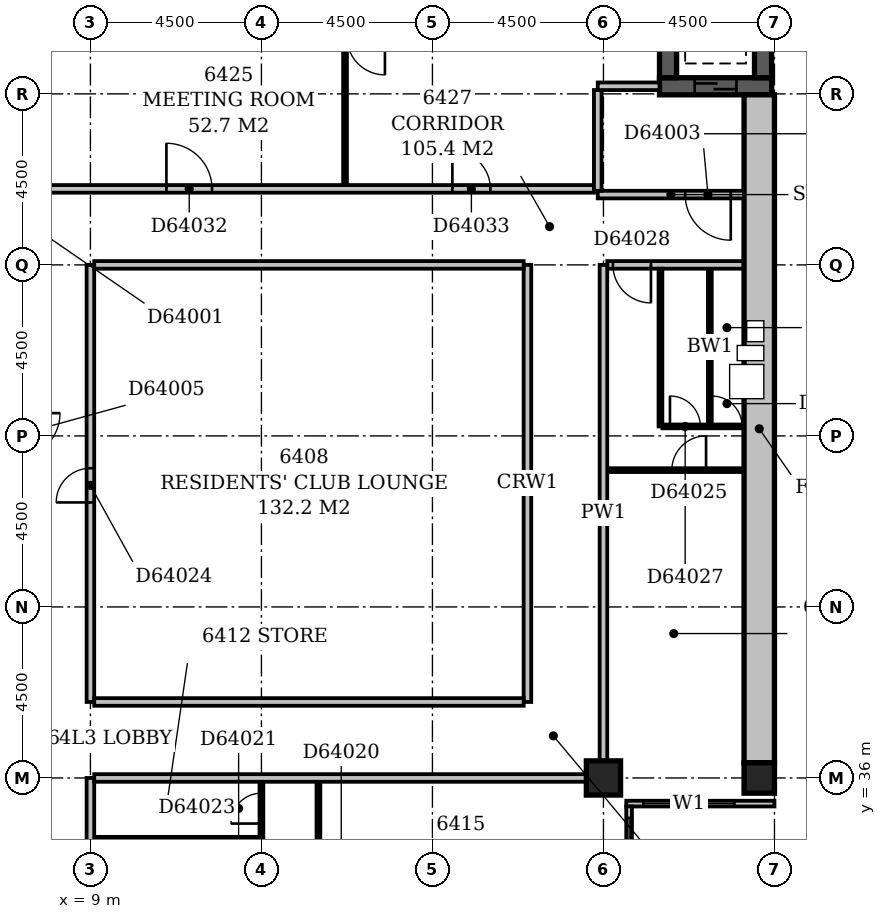
"""IFC4 building model, lengths in metres.
Left out: names, types, materials, properties, quantities, classifications, styles, units other than length and angle.
Written with IfcOpenShell. Run it as: python <this file> out.ifc"""

import sys

from ifc_helpers import new_model, si_unit, direction, frame, frame_2d, origin, origin_2d, place, context, subcontext, project, spatial, rectangle, extrude, element, fill, save


model = new_model("IFC4")
c1 = context("Model", 3, precision=1e-05, world=origin(), true_north=direction((0.0, 1.0)))
c2 = subcontext(c1, "Body", "Model", "MODEL_VIEW")
j1 = project(units=[si_unit("LENGTHUNIT", "METRE"), si_unit("PLANEANGLEUNIT", "RADIAN")], contexts=[c1])
p1 = place(None, origin())
s1 = spatial("IfcSite", under=j1, at=p1, CompositionType="ELEMENT")
p2 = place(p1, origin())
s2 = spatial("IfcBuilding", under=s1, at=p2, CompositionType="ELEMENT")
p3 = place(p2, frame((0.0, 0.0, 247.4)))
s3 = spatial("IfcBuildingStorey", under=s2, at=p3, CompositionType="ELEMENT", Elevation=247.4)
p4 = place(p3, frame((23.975, 54.2, -0.3), z_axis=(0.0, 0.0, 1.0), x_axis=(1.0, 0.0, 0.0)))
e1 = element("IfcWall", 1, at=p4, inside=s3, PredefinedType="SHEAR", context=c2, shape_type="SweptSolid", body=[
    extrude(rectangle(XDim=2.95, YDim=0.45, at=frame_2d((1.475, 0.0))), origin(), (0.0, 0.0, 1.0), 3.6),
])
p5 = place(p4, frame((0.925, 0.0, 0.3)))
e2 = element("IfcOpeningElement", 2, at=p5, cuts=e1, PredefinedType="OPENING", context=c2, shape_type="SweptSolid", body=[
    extrude(rectangle(XDim=1.1, YDim=2.1, at=frame_2d((0.55, 1.05))), frame((0.0, 0.237, 0.0), z_axis=(0.0, -1.0, 0.0), x_axis=(1.0, 0.0, 0.0)), (0.0, 0.0, 1.0), 0.474),
])
for number, where, z_axis, x_axis in (
    (3, (24.2, 54.425, -0.3), (0.0, 0.0, 1.0), (0.0, 1.0, 0.0)),
    (4, (26.7, 54.425, -0.3), (0.0, 0.0, 1.0), (0.0, 1.0, 0.0)),
):
    element("IfcWall", number, at=place(p3, frame(where, z_axis=z_axis, x_axis=x_axis)), inside=s3, PredefinedType="SHEAR", context=c2, shape_type="SweptSolid", body=[
        extrude(rectangle(XDim=3.35, YDim=0.45, at=frame_2d((1.675, 0.0))), origin(), (0.0, 0.0, 1.0), 3.6),
    ])
p6 = place(p3, frame((22.5, 36.0, -0.3), z_axis=(0.0, 0.0, 1.0), x_axis=(1.0, 0.0, 0.0)))
e5 = element("IfcColumn", 5, at=p6, inside=s3, PredefinedType="COLUMN", context=c2, shape_type="SweptSolid", body=[
    extrude(rectangle(XDim=0.9, YDim=0.9, at=origin_2d()), origin(), (0.0, 0.0, 1.0), 3.6),
])
p7 = place(p3, frame((26.6, 36.0, -0.3), z_axis=(0.0, 0.0, 1.0), x_axis=(1.0, 0.0, 0.0)))
e6 = element("IfcColumn", 6, at=p7, inside=s3, PredefinedType="COLUMN", context=c2, shape_type="SweptSolid", body=[
    extrude(rectangle(XDim=0.8, YDim=0.8, at=origin_2d()), origin(), (0.0, 0.0, 1.0), 3.6),
])
p8 = place(p3, frame((23.175, 17.4, 0.0), z_axis=(0.0, 0.0, 1.0), x_axis=(0.0, 1.0, 0.0)))
e7 = element("IfcWall", 7, at=p8, inside=s3, PredefinedType="STANDARD", context=c2, shape_type="SweptSolid", body=[
    extrude(rectangle(XDim=17.85, YDim=0.15, at=frame_2d((8.925, 0.0))), origin(), (0.0, 0.0, 1.0), 2.7),
])
p9 = place(p8, frame((1.65, 0.0, 0.6)))
e8 = element("IfcOpeningElement", 8, at=p9, cuts=e7, PredefinedType="OPENING", context=c2, shape_type="SweptSolid", body=[
    extrude(rectangle(XDim=2.4, YDim=1.8, at=frame_2d((1.2, 0.9))), frame((0.0, 0.087, 0.0), z_axis=(0.0, -1.0, 0.0), x_axis=(1.0, 0.0, 0.0)), (0.0, 0.0, 1.0), 0.174),
])
p10 = place(p8, frame((6.15, 0.0, 0.6)))
e9 = element("IfcOpeningElement", 9, at=p10, cuts=e7, PredefinedType="OPENING", context=c2, shape_type="SweptSolid", body=[
    extrude(rectangle(XDim=2.4, YDim=1.8, at=frame_2d((1.2, 0.9))), frame((0.0, 0.087, 0.0), z_axis=(0.0, -1.0, 0.0), x_axis=(1.0, 0.0, 0.0)), (0.0, 0.0, 1.0), 0.174),
])
p11 = place(p8, frame((10.273, 0.0, 0.6)))
e10 = element("IfcOpeningElement", 10, at=p11, cuts=e7, PredefinedType="OPENING", context=c2, shape_type="SweptSolid", body=[
    extrude(rectangle(XDim=0.6, YDim=1.8, at=frame_2d((0.3, 0.9))), frame((0.0, 0.087, 0.0), z_axis=(0.0, -1.0, 0.0), x_axis=(1.0, 0.0, 0.0)), (0.0, 0.0, 1.0), 0.174),
])
p12 = place(p8, frame((12.78, 0.0, 0.6)))
e11 = element("IfcOpeningElement", 11, at=p12, cuts=e7, PredefinedType="OPENING", context=c2, shape_type="SweptSolid", body=[
    extrude(rectangle(XDim=0.6, YDim=1.8, at=frame_2d((0.3, 0.9))), frame((0.0, 0.087, 0.0), z_axis=(0.0, -1.0, 0.0), x_axis=(1.0, 0.0, 0.0)), (0.0, 0.0, 1.0), 0.174),
])
p13 = place(p8, frame((15.15, 0.0, 0.6)))
e12 = element("IfcOpeningElement", 12, at=p13, cuts=e7, PredefinedType="OPENING", context=c2, shape_type="SweptSolid", body=[
    extrude(rectangle(XDim=2.4, YDim=1.8, at=frame_2d((1.2, 0.9))), frame((0.0, 0.087, 0.0), z_axis=(0.0, -1.0, 0.0), x_axis=(1.0, 0.0, 0.0)), (0.0, 0.0, 1.0), 0.174),
])
p14 = place(p3, frame((23.1, 35.325, 0.0), z_axis=(0.0, 0.0, 1.0), x_axis=(1.0, 0.0, 0.0)))
e13 = element("IfcWall", 13, at=p14, inside=s3, PredefinedType="STANDARD", context=c2, shape_type="SweptSolid", body=[
    extrude(rectangle(XDim=3.9, YDim=0.15, at=frame_2d((1.95, 0.0))), origin(), (0.0, 0.0, 1.0), 2.7),
])
p15 = place(p14, frame((0.45, 0.0, 0.6)))
e14 = element("IfcOpeningElement", 14, at=p15, cuts=e13, PredefinedType="OPENING", context=c2, shape_type="SweptSolid", body=[
    extrude(rectangle(XDim=2.4, YDim=1.8, at=frame_2d((1.2, 0.9))), frame((0.0, 0.087, 0.0), z_axis=(0.0, -1.0, 0.0), x_axis=(1.0, 0.0, 0.0)), (0.0, 0.0, 1.0), 0.174),
])
p16 = place(p3, frame((26.6, 36.4, 0.0), z_axis=(0.0, 0.0, 1.0), x_axis=(0.0, 1.0, 0.0)))
e15 = element("IfcWall", 15, at=p16, inside=s3, PredefinedType="STANDARD", context=c2, shape_type="SweptSolid", body=[
    extrude(rectangle(XDim=17.575, YDim=0.8, at=frame_2d((8.788, 0.0))), origin(), (0.0, 0.0, 1.0), 1.3),
])
p17 = place(p3, frame((22.35, 51.35, 0.0), z_axis=(0.0, 0.0, 1.0), x_axis=(1.0, 0.0, 0.0)))
e16 = element("IfcWall", 16, at=p17, inside=s3, PredefinedType="PARTITIONING", context=c2, shape_type="SweptSolid", body=[
    extrude(rectangle(XDim=3.85, YDim=0.2, at=frame_2d((1.925, 0.0))), origin(), (0.0, 0.0, 1.0), 3.3),
])
p18 = place(p17, frame((2.3, 0.0, 0.0)))
e17 = element("IfcOpeningElement", 17, at=p18, cuts=e16, PredefinedType="OPENING", context=c2, shape_type="SweptSolid", body=[
    extrude(rectangle(XDim=1.2, YDim=2.1, at=frame_2d((0.6, 1.05))), frame((0.0, 0.112, 0.0), z_axis=(0.0, -1.0, 0.0), x_axis=(1.0, 0.0, 0.0)), (0.0, 0.0, 1.0), 0.224),
])
p19 = place(p3, frame((22.35, 54.2, 0.0), z_axis=(0.0, 0.0, 1.0), x_axis=(1.0, 0.0, 0.0)))
e18 = element("IfcWall", 18, at=p19, inside=s3, PredefinedType="PARTITIONING", context=c2, shape_type="SweptSolid", body=[
    extrude(rectangle(XDim=1.625, YDim=0.2, at=frame_2d((0.812, 0.0))), origin(), (0.0, 0.0, 1.0), 3.3),
])
p20 = place(p3, frame((22.35, 51.45, 0.0), z_axis=(0.0, 0.0, 1.0), x_axis=(0.0, 1.0, 0.0)))
e19 = element("IfcWall", 19, at=p20, inside=s3, PredefinedType="PARTITIONING", context=c2, shape_type="SweptSolid", body=[
    extrude(rectangle(XDim=2.65, YDim=0.2, at=frame_2d((1.325, 0.0))), origin(), (0.0, 0.0, 1.0), 3.3),
])
p21 = place(p3, frame((9.0, 18.45, 0.0), z_axis=(0.0, 0.0, 1.0), x_axis=(0.0, 1.0, 0.0)))
e20 = element("IfcWall", 20, at=p21, inside=s3, PredefinedType="PARTITIONING", context=c2, shape_type="SweptSolid", body=[
    extrude(rectangle(XDim=17.55, YDim=0.2, at=frame_2d((8.775, 0.0))), origin(), (0.0, 0.0, 1.0), 3.3),
])
p22 = place(p21, frame((4.35, 0.0, 0.0)))
e21 = element("IfcOpeningElement", 21, at=p22, cuts=e20, PredefinedType="OPENING", context=c2, shape_type="SweptSolid", body=[
    extrude(rectangle(XDim=1.0, YDim=2.1, at=frame_2d((0.5, 1.05))), frame((0.0, 0.112, 0.0), z_axis=(0.0, -1.0, 0.0), x_axis=(1.0, 0.0, 0.0)), (0.0, 0.0, 1.0), 0.224),
])
p23 = place(p21, frame((2.8, 0.0, 0.0)))
e22 = element("IfcOpeningElement", 22, at=p23, cuts=e20, PredefinedType="OPENING", context=c2, shape_type="SweptSolid", body=[
    extrude(rectangle(XDim=1.0, YDim=2.1, at=frame_2d((0.5, 1.05))), frame((0.0, 0.112, 0.0), z_axis=(0.0, -1.0, 0.0), x_axis=(1.0, 0.0, 0.0)), (0.0, 0.0, 1.0), 0.224),
])
p24 = place(p3, frame((15.0, 22.6, 0.0), z_axis=(0.0, 0.0, 1.0), x_axis=(0.0, 1.0, 0.0)))
e23 = element("IfcWall", 23, at=p24, inside=s3, PredefinedType="PARTITIONING", context=c2, shape_type="SweptSolid", body=[
    extrude(rectangle(XDim=13.3, YDim=0.1, at=frame_2d((6.65, 0.0))), origin(), (0.0, 0.0, 1.0), 3.3),
])
p25 = place(p24, frame((1.7, 0.0, 0.0)))
e24 = element("IfcOpeningElement", 24, at=p25, cuts=e23, PredefinedType="OPENING", context=c2, shape_type="SweptSolid", body=[
    extrude(rectangle(XDim=0.9, YDim=2.1, at=frame_2d((0.45, 1.05))), frame((0.0, 0.062, 0.0), z_axis=(0.0, -1.0, 0.0), x_axis=(1.0, 0.0, 0.0)), (0.0, 0.0, 1.0), 0.124),
])
p26 = place(p24, frame((6.2, 0.0, 0.0)))
e25 = element("IfcOpeningElement", 25, at=p26, cuts=e23, PredefinedType="OPENING", context=c2, shape_type="SweptSolid", body=[
    extrude(rectangle(XDim=0.9, YDim=2.1, at=frame_2d((0.45, 1.05))), frame((0.0, 0.062, 0.0), z_axis=(0.0, -1.0, 0.0), x_axis=(1.0, 0.0, 0.0)), (0.0, 0.0, 1.0), 0.124),
])
p27 = place(p24, frame((10.7, 0.0, 0.0)))
e26 = element("IfcOpeningElement", 26, at=p27, cuts=e23, PredefinedType="OPENING", context=c2, shape_type="SweptSolid", body=[
    extrude(rectangle(XDim=0.9, YDim=2.1, at=frame_2d((0.45, 1.05))), frame((0.0, 0.062, 0.0), z_axis=(0.0, -1.0, 0.0), x_axis=(1.0, 0.0, 0.0)), (0.0, 0.0, 1.0), 0.124),
])
p28 = place(p3, frame((13.5, 24.1, 0.0), z_axis=(0.0, 0.0, 1.0), x_axis=(0.0, 1.0, 0.0)))
e27 = element("IfcWall", 27, at=p28, inside=s3, PredefinedType="PARTITIONING", context=c2, shape_type="SweptSolid", body=[
    extrude(rectangle(XDim=11.8, YDim=0.1, at=frame_2d((5.9, 0.0))), origin(), (0.0, 0.0, 1.0), 3.3),
])
p29 = place(p28, frame((8.7, 0.0, 0.0)))
e28 = element("IfcOpeningElement", 28, at=p29, cuts=e27, PredefinedType="OPENING", context=c2, shape_type="SweptSolid", body=[
    extrude(rectangle(XDim=0.8, YDim=2.1, at=frame_2d((0.4, 1.05))), frame((0.0, 0.062, 0.0), z_axis=(0.0, -1.0, 0.0), x_axis=(1.0, 0.0, 0.0)), (0.0, 0.0, 1.0), 0.124),
])
p30 = place(p28, frame((3.5, 0.0, 0.0)))
e29 = element("IfcOpeningElement", 29, at=p30, cuts=e27, PredefinedType="OPENING", context=c2, shape_type="SweptSolid", body=[
    extrude(rectangle(XDim=0.9, YDim=2.1, at=frame_2d((0.45, 1.05))), frame((0.0, 0.062, 0.0), z_axis=(0.0, -1.0, 0.0), x_axis=(1.0, 0.0, 0.0)), (0.0, 0.0, 1.0), 0.124),
])
p31 = place(p28, frame((10.7, 0.0, 0.0)))
e30 = element("IfcOpeningElement", 30, at=p31, cuts=e27, PredefinedType="OPENING", context=c2, shape_type="SweptSolid", body=[
    extrude(rectangle(XDim=0.8, YDim=2.1, at=frame_2d((0.4, 1.05))), frame((0.0, 0.062, 0.0), z_axis=(0.0, -1.0, 0.0), x_axis=(1.0, 0.0, 0.0)), (0.0, 0.0, 1.0), 0.124),
])
p32 = place(p3, frame((9.1, 34.4, 0.0), z_axis=(0.0, 0.0, 1.0), x_axis=(1.0, 0.0, 0.0)))
e31 = element("IfcWall", 31, at=p32, inside=s3, PredefinedType="PLUMBINGWALL", context=c2, shape_type="SweptSolid", body=[
    extrude(rectangle(XDim=4.35, YDim=0.1, at=frame_2d((2.175, 0.0))), origin(), (0.0, 0.0, 1.0), 3.3),
])
p33 = place(p3, frame((9.1, 36.0, 0.0), z_axis=(0.0, 0.0, 1.0), x_axis=(1.0, 0.0, 0.0)))
e32 = element("IfcWall", 32, at=p33, inside=s3, PredefinedType="PARTITIONING", context=c2, shape_type="SweptSolid", body=[
    extrude(rectangle(XDim=12.95, YDim=0.2, at=frame_2d((6.475, 0.0))), origin(), (0.0, 0.0, 1.0), 3.3),
])
p34 = place(p3, frame((22.5, 36.45, 0.0), z_axis=(0.0, 0.0, 1.0), x_axis=(0.0, 1.0, 0.0)))
e33 = element("IfcWall", 33, at=p34, inside=s3, PredefinedType="PARTITIONING", context=c2, shape_type="SweptSolid", body=[
    extrude(rectangle(XDim=13.05, YDim=0.2, at=frame_2d((6.525, 0.0))), origin(), (0.0, 0.0, 1.0), 3.3),
])
p35 = place(p3, frame((9.0, 38.0, 0.0), z_axis=(0.0, 0.0, 1.0), x_axis=(0.0, 1.0, 0.0)))
e34 = element("IfcWall", 34, at=p35, inside=s3, PredefinedType="PARTITIONING", context=c2, shape_type="SweptSolid", body=[
    extrude(rectangle(XDim=11.5, YDim=0.2, at=frame_2d((5.75, 0.0))), origin(), (0.0, 0.0, 1.0), 3.3),
])
p36 = place(p35, frame((5.25, 0.0, 0.0)))
e35 = element("IfcOpeningElement", 35, at=p36, cuts=e34, PredefinedType="OPENING", context=c2, shape_type="SweptSolid", body=[
    extrude(rectangle(XDim=0.9, YDim=2.1, at=frame_2d((0.45, 1.05))), frame((0.0, 0.112, 0.0), z_axis=(0.0, -1.0, 0.0), x_axis=(1.0, 0.0, 0.0)), (0.0, 0.0, 1.0), 0.224),
])
p37 = place(p3, frame((9.1, 38.0, 0.0), z_axis=(0.0, 0.0, 1.0), x_axis=(1.0, 0.0, 0.0)))
e36 = element("IfcWall", 36, at=p37, inside=s3, PredefinedType="PARTITIONING", context=c2, shape_type="SweptSolid", body=[
    extrude(rectangle(XDim=11.3, YDim=0.2, at=frame_2d((5.65, 0.0))), origin(), (0.0, 0.0, 1.0), 3.3),
])
p38 = place(p3, frame((20.5, 38.0, 0.0), z_axis=(0.0, 0.0, 1.0), x_axis=(0.0, 1.0, 0.0)))
e37 = element("IfcWall", 37, at=p38, inside=s3, PredefinedType="PARTITIONING", context=c2, shape_type="SweptSolid", body=[
    extrude(rectangle(XDim=11.5, YDim=0.2, at=frame_2d((5.75, 0.0))), origin(), (0.0, 0.0, 1.0), 3.3),
])
p39 = place(p3, frame((22.6, 44.1, 0.0), z_axis=(0.0, 0.0, 1.0), x_axis=(1.0, 0.0, 0.0)))
e38 = element("IfcWall", 38, at=p39, inside=s3, PredefinedType="PARTITIONING", context=c2, shape_type="SweptSolid", body=[
    extrude(rectangle(XDim=4.4, YDim=0.1, at=frame_2d((2.2, 0.0))), origin(), (0.0, 0.0, 1.0), 3.3),
])
p40 = place(p39, frame((1.7, 0.0, 0.0)))
e39 = element("IfcOpeningElement", 39, at=p40, cuts=e38, PredefinedType="OPENING", context=c2, shape_type="SweptSolid", body=[
    extrude(rectangle(XDim=0.9, YDim=2.1, at=frame_2d((0.45, 1.05))), frame((0.0, 0.062, 0.0), z_axis=(0.0, -1.0, 0.0), x_axis=(1.0, 0.0, 0.0)), (0.0, 0.0, 1.0), 0.124),
])
p41 = place(p3, frame((24.0, 45.25, 0.0), z_axis=(0.0, 0.0, 1.0), x_axis=(0.0, 1.0, 0.0)))
e40 = element("IfcWall", 40, at=p41, inside=s3, PredefinedType="PARTITIONING", context=c2, shape_type="SweptSolid", body=[
    extrude(rectangle(XDim=4.15, YDim=0.1, at=frame_2d((2.075, 0.0))), origin(), (0.0, 0.0, 1.0), 3.3),
])
p42 = place(p3, frame((24.05, 45.25, 0.0), z_axis=(0.0, 0.0, 1.0), x_axis=(1.0, 0.0, 0.0)))
e41 = element("IfcWall", 41, at=p42, inside=s3, PredefinedType="PARTITIONING", context=c2, shape_type="SweptSolid", body=[
    extrude(rectangle(XDim=2.95, YDim=0.1, at=frame_2d((1.475, 0.0))), origin(), (0.0, 0.0, 1.0), 3.3),
])
p43 = place(p42, frame((1.3, 0.0, 0.0)))
e42 = element("IfcOpeningElement", 42, at=p43, cuts=e41, PredefinedType="OPENING", context=c2, shape_type="SweptSolid", body=[
    extrude(rectangle(XDim=0.8, YDim=2.1, at=frame_2d((0.4, 1.05))), frame((0.0, 0.062, 0.0), z_axis=(0.0, -1.0, 0.0), x_axis=(1.0, 0.0, 0.0)), (0.0, 0.0, 1.0), 0.124),
])
p44 = place(p42, frame((0.2, 0.0, 0.0)))
e43 = element("IfcOpeningElement", 43, at=p44, cuts=e41, PredefinedType="OPENING", context=c2, shape_type="SweptSolid", body=[
    extrude(rectangle(XDim=0.8, YDim=2.1, at=frame_2d((0.4, 1.05))), frame((0.0, 0.062, 0.0), z_axis=(0.0, -1.0, 0.0), x_axis=(1.0, 0.0, 0.0)), (0.0, 0.0, 1.0), 0.124),
])
p45 = place(p3, frame((25.3, 45.3, 0.0), z_axis=(0.0, 0.0, 1.0), x_axis=(0.0, 1.0, 0.0)))
e44 = element("IfcWall", 44, at=p45, inside=s3, PredefinedType="PLUMBINGWALL", context=c2, shape_type="SweptSolid", body=[
    extrude(rectangle(XDim=4.1, YDim=0.1, at=frame_2d((2.05, 0.0))), origin(), (0.0, 0.0, 1.0), 3.3),
])
p46 = place(p3, frame((9.1, 49.5, 0.0), z_axis=(0.0, 0.0, 1.0), x_axis=(1.0, 0.0, 0.0)))
e45 = element("IfcWall", 45, at=p46, inside=s3, PredefinedType="PARTITIONING", context=c2, shape_type="SweptSolid", body=[
    extrude(rectangle(XDim=11.3, YDim=0.2, at=frame_2d((5.65, 0.0))), origin(), (0.0, 0.0, 1.0), 3.3),
])
p47 = place(p3, frame((22.6, 49.5, 0.0), z_axis=(0.0, 0.0, 1.0), x_axis=(1.0, 0.0, 0.0)))
e46 = element("IfcWall", 46, at=p47, inside=s3, PredefinedType="PARTITIONING", context=c2, shape_type="SweptSolid", body=[
    extrude(rectangle(XDim=4.4, YDim=0.2, at=frame_2d((2.2, 0.0))), origin(), (0.0, 0.0, 1.0), 3.3),
])
p48 = place(p47, frame((0.15, 0.0, 0.0)))
e47 = element("IfcOpeningElement", 47, at=p48, cuts=e46, PredefinedType="OPENING", context=c2, shape_type="SweptSolid", body=[
    extrude(rectangle(XDim=1.0, YDim=2.1, at=frame_2d((0.5, 1.05))), frame((0.0, 0.112, 0.0), z_axis=(0.0, -1.0, 0.0), x_axis=(1.0, 0.0, 0.0)), (0.0, 0.0, 1.0), 0.224),
])
p49 = place(p3, frame((7.6, 51.5, 0.0), z_axis=(0.0, 0.0, 1.0), x_axis=(1.0, 0.0, 0.0)))
e48 = element("IfcWall", 48, at=p49, inside=s3, PredefinedType="PARTITIONING", context=c2, shape_type="SweptSolid", body=[
    extrude(rectangle(XDim=14.65, YDim=0.2, at=frame_2d((7.325, 0.0))), origin(), (0.0, 0.0, 1.0), 3.3),
])
p50 = place(p49, frame((3.4, 0.0, 0.0)))
e49 = element("IfcOpeningElement", 49, at=p50, cuts=e48, PredefinedType="OPENING", context=c2, shape_type="SweptSolid", body=[
    extrude(rectangle(XDim=1.2, YDim=2.1, at=frame_2d((0.6, 1.05))), frame((0.0, 0.112, 0.0), z_axis=(0.0, -1.0, 0.0), x_axis=(1.0, 0.0, 0.0)), (0.0, 0.0, 1.0), 0.224),
])
p51 = place(p49, frame((10.925, 0.0, 0.0)))
e50 = element("IfcOpeningElement", 50, at=p51, cuts=e48, PredefinedType="OPENING", context=c2, shape_type="SweptSolid", body=[
    extrude(rectangle(XDim=1.0, YDim=2.1, at=frame_2d((0.5, 1.05))), frame((0.0, 0.112, 0.0), z_axis=(0.0, -1.0, 0.0), x_axis=(1.0, 0.0, 0.0)), (0.0, 0.0, 1.0), 0.224),
])
p52 = place(p3, frame((15.7, 51.6, 0.0), z_axis=(0.0, 0.0, 1.0), x_axis=(0.0, 1.0, 0.0)))
e51 = element("IfcWall", 51, at=p52, inside=s3, PredefinedType="PARTITIONING", context=c2, shape_type="SweptSolid", body=[
    extrude(rectangle(XDim=3.8, YDim=0.1, at=frame_2d((1.9, 0.0))), origin(), (0.0, 0.0, 1.0), 3.3),
])
p53 = place(p13, origin())
e52 = element("IfcWindow", 52, at=p53, inside=s3, PartitioningType="SINGLE_PANEL", PredefinedType="WINDOW", context=c2, shape_type="SweptSolid", body=[
    extrude(rectangle(XDim=2.4, YDim=1.8, at=frame_2d((1.2, 0.9))), frame((0.0, 0.03, 0.0), z_axis=(0.0, -1.0, 0.0), x_axis=(1.0, 0.0, 0.0)), (0.0, 0.0, 1.0), 0.06),
])
fill(e12, e52)
p54 = place(p15, origin())
e53 = element("IfcWindow", 53, at=p54, inside=s3, PartitioningType="SINGLE_PANEL", PredefinedType="WINDOW", context=c2, shape_type="SweptSolid", body=[
    extrude(rectangle(XDim=2.4, YDim=1.8, at=frame_2d((1.2, 0.9))), frame((0.0, 0.03, 0.0), z_axis=(0.0, -1.0, 0.0), x_axis=(1.0, 0.0, 0.0)), (0.0, 0.0, 1.0), 0.06),
])
fill(e14, e53)
p55 = place(p18, origin())
e54 = element("IfcDoor", 54, at=p55, inside=s3, OperationType="SINGLE_SWING_RIGHT", PredefinedType="DOOR", context=c2, shape_type="SweptSolid", body=[
    extrude(rectangle(XDim=1.2, YDim=2.1, at=frame_2d((0.6, 1.05))), frame((0.0, 0.025, 0.0), z_axis=(0.0, -1.0, 0.0), x_axis=(1.0, 0.0, 0.0)), (0.0, 0.0, 1.0), 0.05),
])
fill(e17, e54)
p56 = place(p5, origin())
e55 = element("IfcDoor", 55, at=p56, inside=s3, OperationType="SLIDING_TO_LEFT", PredefinedType="DOOR", context=c2, shape_type="SweptSolid", body=[
    extrude(rectangle(XDim=1.1, YDim=2.1, at=frame_2d((0.55, 1.05))), frame((0.0, 0.025, 0.0), z_axis=(0.0, -1.0, 0.0), x_axis=(1.0, 0.0, 0.0)), (0.0, 0.0, 1.0), 0.05),
])
fill(e2, e55)
p57 = place(p31, origin())
e56 = element("IfcDoor", 56, at=p57, inside=s3, OperationType="SINGLE_SWING_LEFT", PredefinedType="DOOR", context=c2, shape_type="SweptSolid", body=[
    extrude(rectangle(XDim=0.8, YDim=2.1, at=frame_2d((0.4, 1.05))), frame((0.0, 0.025, 0.0), z_axis=(0.0, -1.0, 0.0), x_axis=(1.0, 0.0, 0.0)), (0.0, 0.0, 1.0), 0.05),
])
fill(e30, e56)
p58 = place(p36, origin())
e57 = element("IfcDoor", 57, at=p58, inside=s3, OperationType="SINGLE_SWING_LEFT", PredefinedType="DOOR", context=c2, shape_type="SweptSolid", body=[
    extrude(rectangle(XDim=0.9, YDim=2.1, at=frame_2d((0.45, 1.05))), frame((0.0, 0.025, 0.0), z_axis=(0.0, -1.0, 0.0), x_axis=(1.0, 0.0, 0.0)), (0.0, 0.0, 1.0), 0.05),
])
fill(e35, e57)
p59 = place(p40, frame((0.9, 0.0, 0.0), z_axis=(0.0, 0.0, 1.0), x_axis=(-1.0, 0.0, 0.0)))
e58 = element("IfcDoor", 58, at=p59, inside=s3, OperationType="SINGLE_SWING_LEFT", PredefinedType="DOOR", context=c2, shape_type="SweptSolid", body=[
    extrude(rectangle(XDim=0.9, YDim=2.1, at=frame_2d((0.45, 1.05))), frame((0.0, 0.025, 0.0), z_axis=(0.0, -1.0, 0.0), x_axis=(1.0, 0.0, 0.0)), (0.0, 0.0, 1.0), 0.05),
])
fill(e39, e58)
p60 = place(p43, origin())
e59 = element("IfcDoor", 59, at=p60, inside=s3, OperationType="SINGLE_SWING_LEFT", PredefinedType="DOOR", context=c2, shape_type="SweptSolid", body=[
    extrude(rectangle(XDim=0.8, YDim=2.1, at=frame_2d((0.4, 1.05))), frame((0.0, 0.025, 0.0), z_axis=(0.0, -1.0, 0.0), x_axis=(1.0, 0.0, 0.0)), (0.0, 0.0, 1.0), 0.05),
])
fill(e42, e59)
p61 = place(p44, origin())
e60 = element("IfcDoor", 60, at=p61, inside=s3, OperationType="SINGLE_SWING_LEFT", PredefinedType="DOOR", context=c2, shape_type="SweptSolid", body=[
    extrude(rectangle(XDim=0.8, YDim=2.1, at=frame_2d((0.4, 1.05))), frame((0.0, 0.025, 0.0), z_axis=(0.0, -1.0, 0.0), x_axis=(1.0, 0.0, 0.0)), (0.0, 0.0, 1.0), 0.05),
])
fill(e43, e60)
p62 = place(p48, origin())
e61 = element("IfcDoor", 61, at=p62, inside=s3, OperationType="SINGLE_SWING_RIGHT", PredefinedType="DOOR", context=c2, shape_type="SweptSolid", body=[
    extrude(rectangle(XDim=1.0, YDim=2.1, at=frame_2d((0.5, 1.05))), frame((0.0, 0.025, 0.0), z_axis=(0.0, -1.0, 0.0), x_axis=(1.0, 0.0, 0.0)), (0.0, 0.0, 1.0), 0.05),
])
fill(e47, e61)
p63 = place(p50, origin())
e62 = element("IfcDoor", 62, at=p63, inside=s3, OperationType="SINGLE_SWING_LEFT", PredefinedType="DOOR", context=c2, shape_type="SweptSolid", body=[
    extrude(rectangle(XDim=1.2, YDim=2.1, at=frame_2d((0.6, 1.05))), frame((0.0, 0.025, 0.0), z_axis=(0.0, -1.0, 0.0), x_axis=(1.0, 0.0, 0.0)), (0.0, 0.0, 1.0), 0.05),
])
fill(e49, e62)
p64 = place(p51, origin())
e63 = element("IfcDoor", 63, at=p64, inside=s3, OperationType="SINGLE_SWING_LEFT", PredefinedType="DOOR", context=c2, shape_type="SweptSolid", body=[
    extrude(rectangle(XDim=1.0, YDim=2.1, at=frame_2d((0.5, 1.05))), frame((0.0, 0.025, 0.0), z_axis=(0.0, -1.0, 0.0), x_axis=(1.0, 0.0, 0.0)), (0.0, 0.0, 1.0), 0.05),
])
fill(e50, e63)
save(model, sys.argv[1])
